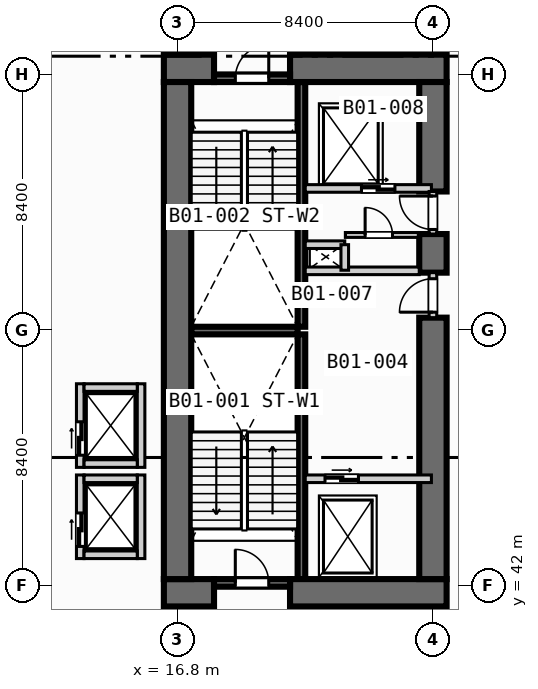
"""IFC4 building model, lengths in metres.
Left out: names, types, materials, properties, quantities, classifications, styles, units other than length and angle.
Written with IfcOpenShell. Run it as: python <this file> out.ifc"""

import sys

from ifc_helpers import new_model, si_unit, direction, frame, frame_2d, origin, place, context, subcontext, project, spatial, rectangle, extrude, element, fill, save


model = new_model("IFC4")
c1 = context("Model", 3, precision=1e-05, world=origin(), true_north=direction((0.0, 1.0)))
c2 = subcontext(c1, "Body", "Model", "MODEL_VIEW")
j1 = project(units=[si_unit("LENGTHUNIT", "METRE"), si_unit("PLANEANGLEUNIT", "RADIAN")], contexts=[c1])
p1 = place(None, origin())
s1 = spatial("IfcSite", under=j1, at=p1, CompositionType="ELEMENT")
p2 = place(p1, origin())
s2 = spatial("IfcBuilding", under=s1, at=p2, CompositionType="ELEMENT")
p3 = place(p2, frame((0.0, 0.0, -4.2)))
s3 = spatial("IfcBuildingStorey", under=s2, at=p3, CompositionType="ELEMENT", Elevation=-4.2)
for number, where, z_axis, x_axis in (
    (1, (20.875, 42.2, 0.0), (0.0, 0.0, 1.0), (0.0, 1.0, 0.0)),
    (2, (20.875, 50.5, 0.0), (0.0, 0.0, 1.0), (0.0, 1.0, 0.0)),
):
    element("IfcWall", number, at=place(p3, frame(where, z_axis=z_axis, x_axis=x_axis)), inside=s3, PredefinedType="SOLIDWALL", context=c2, shape_type="SweptSolid", body=[
        extrude(rectangle(XDim=8.05, YDim=0.25, at=frame_2d((4.025, 0.0))), origin(), (0.0, 0.0, 1.0), 3.85),
    ])
p4 = place(p3, frame((17.25, 50.375, 0.0), z_axis=(0.0, 0.0, 1.0), x_axis=(1.0, 0.0, 0.0)))
e3 = element("IfcWall", 3, at=p4, inside=s3, PredefinedType="SOLIDWALL", context=c2, shape_type="SweptSolid", body=[
    extrude(rectangle(XDim=3.5, YDim=0.25, at=frame_2d((1.75, 0.0))), origin(), (0.0, 0.0, 1.0), 3.85),
])
p5 = place(p3, frame((16.35, 41.75, 0.0), z_axis=(0.0, 0.0, 1.0), x_axis=(1.0, 0.0, 0.0)))
e4 = element("IfcWall", 4, at=p5, inside=s3, PredefinedType="SHEAR", context=c2, shape_type="SweptSolid", body=[
    extrude(rectangle(XDim=1.65, YDim=0.9, at=frame_2d((0.825, 0.0))), origin(), (0.0, 0.0, 1.0), 3.85),
])
p6 = place(p3, frame((20.5, 41.75, 0.0), z_axis=(0.0, 0.0, 1.0), x_axis=(1.0, 0.0, 0.0)))
e5 = element("IfcWall", 5, at=p6, inside=s3, PredefinedType="SHEAR", context=c2, shape_type="SweptSolid", body=[
    extrude(rectangle(XDim=5.15, YDim=0.9, at=frame_2d((2.575, 0.0))), origin(), (0.0, 0.0, 1.0), 3.85),
])
p7 = place(p3, frame((16.35, 59.0, 0.0), z_axis=(0.0, 0.0, 1.0), x_axis=(1.0, 0.0, 0.0)))
e6 = element("IfcWall", 6, at=p7, inside=s3, PredefinedType="SHEAR", context=c2, shape_type="SweptSolid", body=[
    extrude(rectangle(XDim=1.65, YDim=0.9, at=frame_2d((0.825, 0.0))), origin(), (0.0, 0.0, 1.0), 3.85),
])
p8 = place(p3, frame((20.5, 59.0, 0.0), z_axis=(0.0, 0.0, 1.0), x_axis=(1.0, 0.0, 0.0)))
e7 = element("IfcWall", 7, at=p8, inside=s3, PredefinedType="SHEAR", context=c2, shape_type="SweptSolid", body=[
    extrude(rectangle(XDim=5.15, YDim=0.9, at=frame_2d((2.575, 0.0))), origin(), (0.0, 0.0, 1.0), 3.85),
])
p9 = place(p3, frame((16.8, 42.2, 0.0), z_axis=(0.0, 0.0, 1.0), x_axis=(0.0, 1.0, 0.0)))
e8 = element("IfcWall", 8, at=p9, inside=s3, PredefinedType="SHEAR", context=c2, shape_type="SweptSolid", body=[
    extrude(rectangle(XDim=16.35, YDim=0.9, at=frame_2d((8.175, 0.0))), origin(), (0.0, 0.0, 1.0), 3.85),
])
p10 = place(p3, frame((25.2, 42.2, 0.0), z_axis=(0.0, 0.0, 1.0), x_axis=(0.0, 1.0, 0.0)))
e9 = element("IfcWall", 9, at=p10, inside=s3, PredefinedType="SHEAR", context=c2, shape_type="SweptSolid", body=[
    extrude(rectangle(XDim=8.6, YDim=0.9, at=frame_2d((4.3, 0.0))), origin(), (0.0, 0.0, 1.0), 3.85),
])
p11 = place(p3, frame((25.2, 52.28, 0.0), z_axis=(0.0, 0.0, 1.0), x_axis=(0.0, 1.0, 0.0)))
e10 = element("IfcWall", 10, at=p11, inside=s3, PredefinedType="SHEAR", context=c2, shape_type="SweptSolid", body=[
    extrude(rectangle(XDim=1.27, YDim=0.9, at=frame_2d((0.635, 0.0))), origin(), (0.0, 0.0, 1.0), 3.85),
])
p12 = place(p3, frame((25.2, 54.95, 0.0), z_axis=(0.0, 0.0, 1.0), x_axis=(0.0, 1.0, 0.0)))
e11 = element("IfcWall", 11, at=p12, inside=s3, PredefinedType="SHEAR", context=c2, shape_type="SweptSolid", body=[
    extrude(rectangle(XDim=3.6, YDim=0.9, at=frame_2d((1.8, 0.0))), origin(), (0.0, 0.0, 1.0), 3.85),
])
p13 = place(p3, frame((18.0, 42.075, 0.0), z_axis=(0.0, 0.0, 1.0), x_axis=(1.0, 0.0, 0.0)))
e12 = element("IfcWall", 12, at=p13, inside=s3, PredefinedType="SOLIDWALL", context=c2, shape_type="SweptSolid", body=[
    extrude(rectangle(XDim=2.5, YDim=0.25, at=frame_2d((1.25, 0.0))), origin(), (0.0, 0.0, 1.0), 3.85),
])
p14 = place(p13, frame((0.7, 0.0, 0.0)))
e13 = element("IfcOpeningElement", 13, at=p14, cuts=e12, PredefinedType="OPENING", context=c2, shape_type="SweptSolid", body=[
    extrude(rectangle(XDim=1.1, YDim=2.15, at=frame_2d((0.55, 1.075))), frame((0.0, 0.135, 0.0), z_axis=(0.0, -1.0, 0.0), x_axis=(1.0, 0.0, 0.0)), (0.0, 0.0, 1.0), 0.27),
])
p15 = place(p3, frame((18.0, 58.675, 0.0), z_axis=(0.0, 0.0, 1.0), x_axis=(1.0, 0.0, 0.0)))
e14 = element("IfcWall", 14, at=p15, inside=s3, PredefinedType="SOLIDWALL", context=c2, shape_type="SweptSolid", body=[
    extrude(rectangle(XDim=2.5, YDim=0.25, at=frame_2d((1.25, 0.0))), origin(), (0.0, 0.0, 1.0), 3.85),
])
p16 = place(p15, frame((0.7, 0.0, 0.0)))
e15 = element("IfcOpeningElement", 15, at=p16, cuts=e14, PredefinedType="OPENING", context=c2, shape_type="SweptSolid", body=[
    extrude(rectangle(XDim=1.1, YDim=2.15, at=frame_2d((0.55, 1.075))), frame((0.0, 0.135, 0.0), z_axis=(0.0, -1.0, 0.0), x_axis=(1.0, 0.0, 0.0)), (0.0, 0.0, 1.0), 0.27),
])
p17 = place(p3, frame((21.0, 45.5, 0.0), z_axis=(0.0, 0.0, 1.0), x_axis=(1.0, 0.0, 0.0)))
e16 = element("IfcWall", 16, at=p17, inside=s3, PredefinedType="SOLIDWALL", context=c2, shape_type="SweptSolid", body=[
    extrude(rectangle(XDim=4.15, YDim=0.25, at=frame_2d((2.075, 0.0))), origin(), (0.0, 0.0, 1.0), 3.85),
])
p18 = place(p17, frame((0.65, 0.0, 0.0)))
e17 = element("IfcOpeningElement", 17, at=p18, cuts=e16, PredefinedType="OPENING", context=c2, shape_type="SweptSolid", body=[
    extrude(rectangle(XDim=1.1, YDim=2.15, at=frame_2d((0.55, 1.075))), frame((0.0, 0.135, 0.0), z_axis=(0.0, -1.0, 0.0), x_axis=(1.0, 0.0, 0.0)), (0.0, 0.0, 1.0), 0.27),
])
p19 = place(p3, frame((25.2, 50.8, 0.0), z_axis=(0.0, 0.0, 1.0), x_axis=(0.0, 1.0, 0.0)))
e18 = element("IfcWall", 18, at=p19, inside=s3, PredefinedType="SOLIDWALL", context=c2, shape_type="SweptSolid", body=[
    extrude(rectangle(XDim=1.48, YDim=0.25, at=frame_2d((0.74, 0.0))), origin(), (0.0, 0.0, 1.0), 3.85),
])
p20 = place(p19, frame((0.18, 0.0, 0.0)))
e19 = element("IfcOpeningElement", 19, at=p20, cuts=e18, PredefinedType="OPENING", context=c2, shape_type="SweptSolid", body=[
    extrude(rectangle(XDim=1.1, YDim=2.15, at=frame_2d((0.55, 1.075))), frame((0.0, 0.135, 0.0), z_axis=(0.0, -1.0, 0.0), x_axis=(1.0, 0.0, 0.0)), (0.0, 0.0, 1.0), 0.27),
])
p21 = place(p3, frame((21.0, 52.34, 0.0), z_axis=(0.0, 0.0, 1.0), x_axis=(1.0, 0.0, 0.0)))
e20 = element("IfcWall", 20, at=p21, inside=s3, PredefinedType="SOLIDWALL", context=c2, shape_type="SweptSolid", body=[
    extrude(rectangle(XDim=3.75, YDim=0.25, at=frame_2d((1.875, 0.0))), origin(), (0.0, 0.0, 1.0), 3.85),
])
p22 = place(p3, frame((21.0, 55.05, 0.0), z_axis=(0.0, 0.0, 1.0), x_axis=(1.0, 0.0, 0.0)))
e21 = element("IfcWall", 21, at=p22, inside=s3, PredefinedType="SOLIDWALL", context=c2, shape_type="SweptSolid", body=[
    extrude(rectangle(XDim=4.15, YDim=0.25, at=frame_2d((2.075, 0.0))), origin(), (0.0, 0.0, 1.0), 3.85),
])
p23 = place(p22, frame((1.85, 0.0, 0.0)))
e22 = element("IfcOpeningElement", 22, at=p23, cuts=e21, PredefinedType="OPENING", context=c2, shape_type="SweptSolid", body=[
    extrude(rectangle(XDim=1.1, YDim=2.15, at=frame_2d((0.55, 1.075))), frame((0.0, 0.135, 0.0), z_axis=(0.0, -1.0, 0.0), x_axis=(1.0, 0.0, 0.0)), (0.0, 0.0, 1.0), 0.27),
])
p24 = place(p3, frame((25.2, 53.55, 0.0), z_axis=(0.0, 0.0, 1.0), x_axis=(0.0, 1.0, 0.0)))
e23 = element("IfcWall", 23, at=p24, inside=s3, PredefinedType="SOLIDWALL", context=c2, shape_type="SweptSolid", body=[
    extrude(rectangle(XDim=1.4, YDim=0.25, at=frame_2d((0.7, 0.0))), origin(), (0.0, 0.0, 1.0), 3.85),
])
p25 = place(p24, frame((0.15, 0.0, 0.0)))
e24 = element("IfcOpeningElement", 24, at=p25, cuts=e23, PredefinedType="OPENING", context=c2, shape_type="SweptSolid", body=[
    extrude(rectangle(XDim=1.1, YDim=2.15, at=frame_2d((0.55, 1.075))), frame((0.0, 0.135, 0.0), z_axis=(0.0, -1.0, 0.0), x_axis=(1.0, 0.0, 0.0)), (0.0, 0.0, 1.0), 0.27),
])
p26 = place(p3, frame((21.0, 53.2, 0.0), z_axis=(0.0, 0.0, 1.0), x_axis=(1.0, 0.0, 0.0)))
e25 = element("IfcWall", 25, at=p26, inside=s3, PredefinedType="SOLIDWALL", context=c2, shape_type="SweptSolid", body=[
    extrude(rectangle(XDim=1.3, YDim=0.25, at=frame_2d((0.65, 0.0))), origin(), (0.0, 0.0, 1.0), 3.85),
])
p27 = place(p3, frame((22.3, 52.36, 0.0), z_axis=(0.0, 0.0, 1.0), x_axis=(0.0, 1.0, 0.0)))
e26 = element("IfcWall", 26, at=p27, inside=s3, PredefinedType="SOLIDWALL", context=c2, shape_type="SweptSolid", body=[
    extrude(rectangle(XDim=0.84, YDim=0.25, at=frame_2d((0.42, 0.0))), origin(), (0.0, 0.0, 1.0), 3.85),
])
p28 = place(p3, frame((22.32, 53.52, 0.0), z_axis=(0.0, 0.0, 1.0), x_axis=(1.0, 0.0, 0.0)))
e27 = element("IfcWall", 27, at=p28, inside=s3, PredefinedType="PARTITIONING", context=c2, shape_type="SweptSolid", body=[
    extrude(rectangle(XDim=2.4, YDim=0.16, at=frame_2d((1.2, 0.0))), origin(), (0.0, 0.0, 1.0), 3.85),
])
p29 = place(p28, frame((0.65, 0.0, 0.0)))
e28 = element("IfcOpeningElement", 28, at=p29, cuts=e27, PredefinedType="OPENING", context=c2, shape_type="SweptSolid", body=[
    extrude(rectangle(XDim=0.9, YDim=2.1, at=frame_2d((0.45, 1.05))), frame((0.0, 0.09, 0.0), z_axis=(0.0, -1.0, 0.0), x_axis=(1.0, 0.0, 0.0)), (0.0, 0.0, 1.0), 0.18),
])
p30 = place(p3, frame((13.6, 42.875, 0.0), z_axis=(0.0, 0.0, 1.0), x_axis=(0.0, 1.0, 0.0)))
e29 = element("IfcWall", 29, at=p30, inside=s3, PredefinedType="SOLIDWALL", context=c2, shape_type="SweptSolid", body=[
    extrude(rectangle(XDim=2.75, YDim=0.25, at=frame_2d((1.375, 0.0))), origin(), (0.0, 0.0, 1.0), 3.85),
])
p31 = place(p30, frame((0.4, 0.0, 0.0)))
e30 = element("IfcOpeningElement", 30, at=p31, cuts=e29, PredefinedType="OPENING", context=c2, shape_type="SweptSolid", body=[
    extrude(rectangle(XDim=1.1, YDim=2.15, at=frame_2d((0.55, 1.075))), frame((0.0, 0.135, 0.0), z_axis=(0.0, -1.0, 0.0), x_axis=(1.0, 0.0, 0.0)), (0.0, 0.0, 1.0), 0.27),
])
p32 = place(p3, frame((15.6, 42.875, 0.0), z_axis=(0.0, 0.0, 1.0), x_axis=(0.0, 1.0, 0.0)))
e31 = element("IfcWall", 31, at=p32, inside=s3, PredefinedType="SOLIDWALL", context=c2, shape_type="SweptSolid", body=[
    extrude(rectangle(XDim=2.75, YDim=0.25, at=frame_2d((1.375, 0.0))), origin(), (0.0, 0.0, 1.0), 3.85),
])
for number, where, z_axis, x_axis in (
    (32, (13.725, 43.0, 0.0), (0.0, 0.0, 1.0), (1.0, 0.0, 0.0)),
    (33, (13.725, 45.5, 0.0), (0.0, 0.0, 1.0), (1.0, 0.0, 0.0)),
):
    element("IfcWall", number, at=place(p3, frame(where, z_axis=z_axis, x_axis=x_axis)), inside=s3, PredefinedType="SOLIDWALL", context=c2, shape_type="SweptSolid", body=[
        extrude(rectangle(XDim=1.75, YDim=0.25, at=frame_2d((0.875, 0.0))), origin(), (0.0, 0.0, 1.0), 3.85),
    ])
p33 = place(p3, frame((13.6, 45.875, 0.0), z_axis=(0.0, 0.0, 1.0), x_axis=(0.0, 1.0, 0.0)))
e34 = element("IfcWall", 34, at=p33, inside=s3, PredefinedType="SOLIDWALL", context=c2, shape_type="SweptSolid", body=[
    extrude(rectangle(XDim=2.75, YDim=0.25, at=frame_2d((1.375, 0.0))), origin(), (0.0, 0.0, 1.0), 3.85),
])
p34 = place(p33, frame((0.4, 0.0, 0.0)))
e35 = element("IfcOpeningElement", 35, at=p34, cuts=e34, PredefinedType="OPENING", context=c2, shape_type="SweptSolid", body=[
    extrude(rectangle(XDim=1.1, YDim=2.15, at=frame_2d((0.55, 1.075))), frame((0.0, 0.135, 0.0), z_axis=(0.0, -1.0, 0.0), x_axis=(1.0, 0.0, 0.0)), (0.0, 0.0, 1.0), 0.27),
])
p35 = place(p3, frame((15.6, 45.875, 0.0), z_axis=(0.0, 0.0, 1.0), x_axis=(0.0, 1.0, 0.0)))
e36 = element("IfcWall", 36, at=p35, inside=s3, PredefinedType="SOLIDWALL", context=c2, shape_type="SweptSolid", body=[
    extrude(rectangle(XDim=2.75, YDim=0.25, at=frame_2d((1.375, 0.0))), origin(), (0.0, 0.0, 1.0), 3.85),
])
for number, where, z_axis, x_axis in (
    (37, (13.725, 46.0, 0.0), (0.0, 0.0, 1.0), (1.0, 0.0, 0.0)),
    (38, (13.725, 48.5, 0.0), (0.0, 0.0, 1.0), (1.0, 0.0, 0.0)),
):
    element("IfcWall", number, at=place(p3, frame(where, z_axis=z_axis, x_axis=x_axis)), inside=s3, PredefinedType="SOLIDWALL", context=c2, shape_type="SweptSolid", body=[
        extrude(rectangle(XDim=1.75, YDim=0.25, at=frame_2d((0.875, 0.0))), origin(), (0.0, 0.0, 1.0), 3.85),
    ])
p36 = place(p14, origin())
e39 = element("IfcDoor", 39, at=p36, inside=s3, OperationType="SINGLE_SWING_LEFT", PredefinedType="DOOR", context=c2, shape_type="SweptSolid", body=[
    extrude(rectangle(XDim=1.1, YDim=2.15, at=frame_2d((0.55, 1.075))), frame((0.0, 0.025, 0.0), z_axis=(0.0, -1.0, 0.0), x_axis=(1.0, 0.0, 0.0)), (0.0, 0.0, 1.0), 0.05),
])
fill(e13, e39)
p37 = place(p16, origin())
e40 = element("IfcDoor", 40, at=p37, inside=s3, OperationType="SINGLE_SWING_RIGHT", PredefinedType="DOOR", context=c2, shape_type="SweptSolid", body=[
    extrude(rectangle(XDim=1.1, YDim=2.15, at=frame_2d((0.55, 1.075))), frame((0.0, 0.025, 0.0), z_axis=(0.0, -1.0, 0.0), x_axis=(1.0, 0.0, 0.0)), (0.0, 0.0, 1.0), 0.05),
])
fill(e15, e40)
p38 = place(p18, origin())
e41 = element("IfcDoor", 41, at=p38, inside=s3, OperationType="SLIDING_TO_LEFT", PredefinedType="DOOR", context=c2, shape_type="SweptSolid", body=[
    extrude(rectangle(XDim=1.1, YDim=2.15, at=frame_2d((0.55, 1.075))), frame((0.0, 0.025, 0.0), z_axis=(0.0, -1.0, 0.0), x_axis=(1.0, 0.0, 0.0)), (0.0, 0.0, 1.0), 0.05),
])
fill(e17, e41)
p39 = place(p20, origin())
e42 = element("IfcDoor", 42, at=p39, inside=s3, OperationType="SINGLE_SWING_LEFT", PredefinedType="DOOR", context=c2, shape_type="SweptSolid", body=[
    extrude(rectangle(XDim=1.1, YDim=2.15, at=frame_2d((0.55, 1.075))), frame((0.0, 0.025, 0.0), z_axis=(0.0, -1.0, 0.0), x_axis=(1.0, 0.0, 0.0)), (0.0, 0.0, 1.0), 0.05),
])
fill(e19, e42)
p40 = place(p23, origin())
e43 = element("IfcDoor", 43, at=p40, inside=s3, OperationType="SLIDING_TO_LEFT", PredefinedType="DOOR", context=c2, shape_type="SweptSolid", body=[
    extrude(rectangle(XDim=1.1, YDim=2.15, at=frame_2d((0.55, 1.075))), frame((0.0, 0.025, 0.0), z_axis=(0.0, -1.0, 0.0), x_axis=(1.0, 0.0, 0.0)), (0.0, 0.0, 1.0), 0.05),
])
fill(e22, e43)
p41 = place(p25, origin())
e44 = element("IfcDoor", 44, at=p41, inside=s3, OperationType="SINGLE_SWING_RIGHT", PredefinedType="DOOR", context=c2, shape_type="SweptSolid", body=[
    extrude(rectangle(XDim=1.1, YDim=2.15, at=frame_2d((0.55, 1.075))), frame((0.0, 0.025, 0.0), z_axis=(0.0, -1.0, 0.0), x_axis=(1.0, 0.0, 0.0)), (0.0, 0.0, 1.0), 0.05),
])
fill(e24, e44)
p42 = place(p29, origin())
e45 = element("IfcDoor", 45, at=p42, inside=s3, OperationType="SINGLE_SWING_LEFT", PredefinedType="DOOR", context=c2, shape_type="SweptSolid", body=[
    extrude(rectangle(XDim=0.9, YDim=2.1, at=frame_2d((0.45, 1.05))), frame((0.0, 0.025, 0.0), z_axis=(0.0, -1.0, 0.0), x_axis=(1.0, 0.0, 0.0)), (0.0, 0.0, 1.0), 0.05),
])
fill(e28, e45)
p43 = place(p31, origin())
e46 = element("IfcDoor", 46, at=p43, inside=s3, OperationType="SLIDING_TO_LEFT", PredefinedType="DOOR", context=c2, shape_type="SweptSolid", body=[
    extrude(rectangle(XDim=1.1, YDim=2.15, at=frame_2d((0.55, 1.075))), frame((0.0, 0.025, 0.0), z_axis=(0.0, -1.0, 0.0), x_axis=(1.0, 0.0, 0.0)), (0.0, 0.0, 1.0), 0.05),
])
fill(e30, e46)
p44 = place(p34, origin())
e47 = element("IfcDoor", 47, at=p44, inside=s3, OperationType="SLIDING_TO_LEFT", PredefinedType="DOOR", context=c2, shape_type="SweptSolid", body=[
    extrude(rectangle(XDim=1.1, YDim=2.15, at=frame_2d((0.55, 1.075))), frame((0.0, 0.025, 0.0), z_axis=(0.0, -1.0, 0.0), x_axis=(1.0, 0.0, 0.0)), (0.0, 0.0, 1.0), 0.05),
])
fill(e35, e47)
save(model, sys.argv[1])
